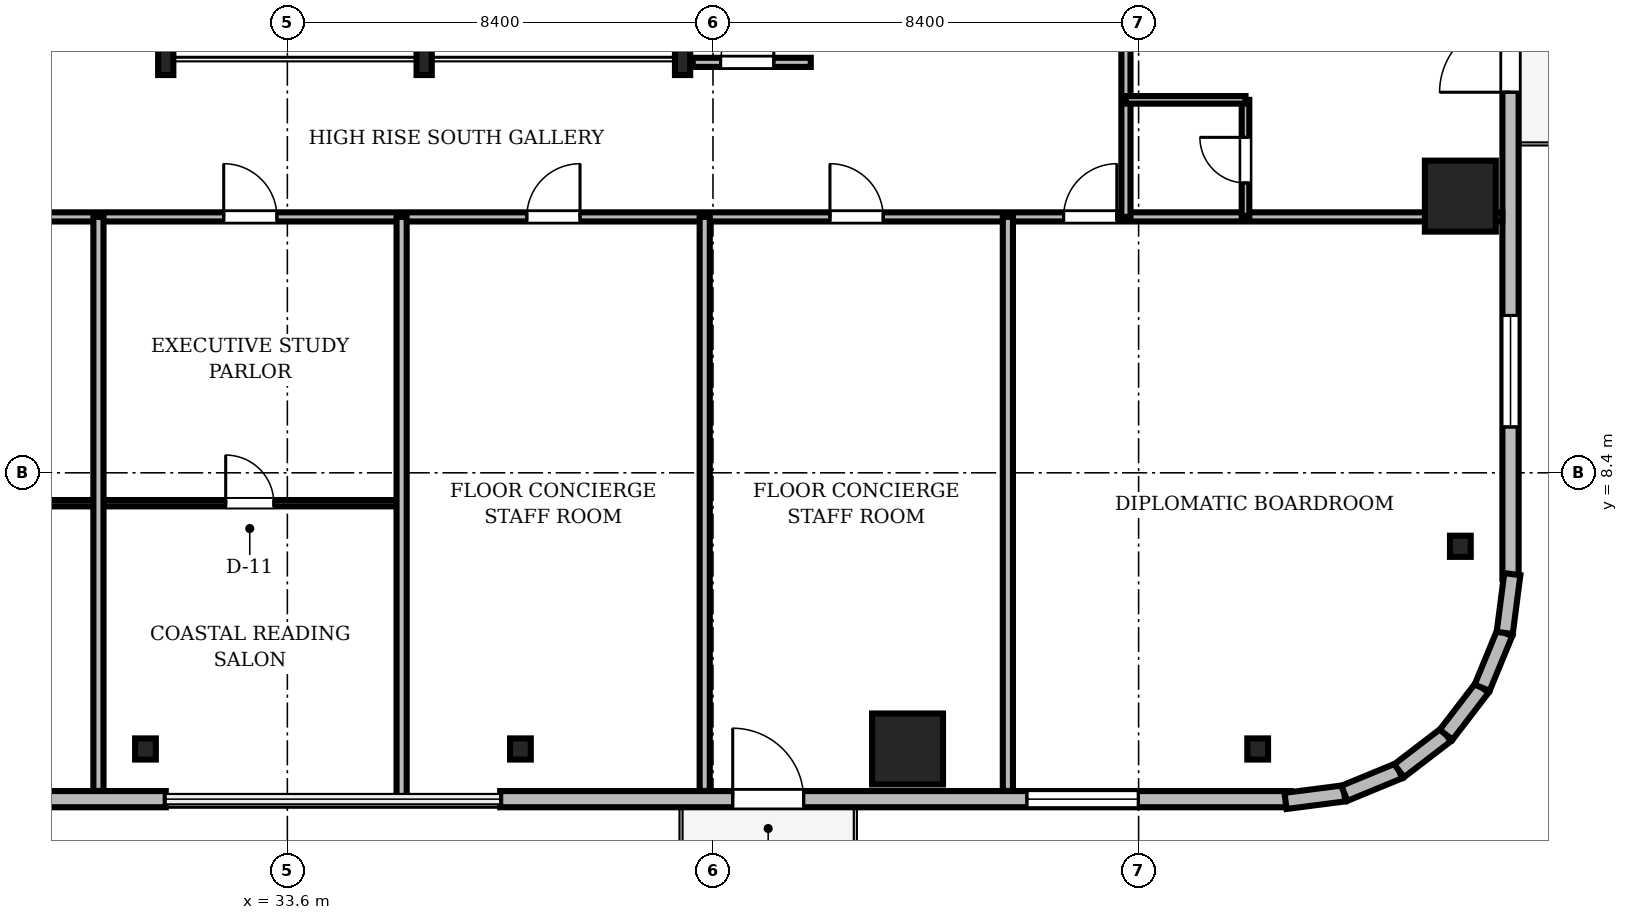
"""IFC4 building model, lengths in metres.
Left out: names, types, materials, properties, quantities, classifications, styles, units other than length and angle.
Written with IfcOpenShell. Run it as: python <this file> out.ifc"""

import sys

from ifc_helpers import new_model, si_unit, direction, frame, frame_2d, origin, origin_2d, place, context, subcontext, project, spatial, rectangle, i_section, extrude, source, transform, mapped, element, fill, save


model = new_model("IFC4")
c1 = context("Model", 3, precision=1e-05, world=origin(), true_north=direction((0.0, 1.0)))
c2 = subcontext(c1, "Body", "Model", "MODEL_VIEW")
j1 = project(units=[si_unit("LENGTHUNIT", "METRE"), si_unit("PLANEANGLEUNIT", "RADIAN")], contexts=[c1])
p1 = place(None, origin())
s1 = spatial("IfcSite", under=j1, at=p1, CompositionType="ELEMENT")
p2 = place(p1, origin())
s2 = spatial("IfcBuilding", under=s1, at=p2, CompositionType="ELEMENT")
p3 = place(p2, frame((0.0, 0.0, 207.3)))
s3 = spatial("IfcBuildingStorey", under=s2, at=p3, CompositionType="ELEMENT", Elevation=207.3)
m1 = source(origin(), c2, "Body", "SweptSolid", [
    extrude(i_section(OverallWidth=0.3, OverallDepth=0.7, WebThickness=0.017, FlangeThickness=0.032, FilletRadius=0.027, at=origin_2d()), origin(), (0.0, 0.0, 1.0), 3.53),
])
for number, where, z_axis, x_axis in (
    (1, (31.2, 16.6, 0.0), (0.0, 0.0, 1.0), (1.0, 0.0, 0.0)),
    (2, (36.3, 16.6, 0.0), (0.0, 0.0, 1.0), (1.0, 0.0, 0.0)),
    (3, (41.4, 16.6, 0.0), (0.0, 0.0, 1.0), (1.0, 0.0, 0.0)),
):
    element("IfcColumn", number, at=place(p3, frame(where, z_axis=z_axis, x_axis=x_axis)), inside=s3, PredefinedType="COLUMN", context=c2, shape_type="MappedRepresentation", body=[
        mapped(m1, transform((0.0, 0.0, 0.0), scale=1.0)),
    ])
m2 = source(origin(), c2, "Body", "SweptSolid", [
    extrude(rectangle(XDim=1.4, YDim=1.4, at=origin_2d()), origin(), (0.0, 0.0, 1.0), 3.53),
])
for number, where, z_axis, x_axis in (
    (4, (45.84, 2.95, 0.0), (0.0, 0.0, 1.0), (1.0, 0.0, 0.0)),
    (5, (56.75, 13.86, 0.0), (0.0, 0.0, 1.0), (1.0, 0.0, 0.0)),
):
    element("IfcColumn", number, at=place(p3, frame(where, z_axis=z_axis, x_axis=x_axis)), inside=s3, PredefinedType="COLUMN", context=c2, shape_type="MappedRepresentation", body=[
        mapped(m2, transform((0.0, 0.0, 0.0), scale=1.0)),
    ])
m3 = source(origin(), c2, "Body", "SweptSolid", [
    extrude(i_section(OverallWidth=0.409, OverallDepth=0.417, WebThickness=0.021, FlangeThickness=0.033, FilletRadius=0.015, at=origin_2d()), origin(), (0.0, 0.0, 1.0), 3.53),
])
for number, where, z_axis, x_axis in (
    (6, (30.8, 2.95, 0.0), (0.0, 0.0, 1.0), (1.0, 0.0, 0.0)),
    (7, (38.2, 2.95, 0.0), (0.0, 0.0, 1.0), (1.0, 0.0, 0.0)),
    (8, (52.75, 2.95, 0.0), (0.0, 0.0, 1.0), (1.0, 0.0, 0.0)),
    (9, (56.75, 6.95, 0.0), (0.0, 0.0, 1.0), (1.0, 0.0, 0.0)),
):
    element("IfcColumn", number, at=place(p3, frame(where, z_axis=z_axis, x_axis=x_axis)), inside=s3, PredefinedType="COLUMN", context=c2, shape_type="MappedRepresentation", body=[
        mapped(m3, transform((0.0, 0.0, 0.0), scale=1.0)),
    ])
m4 = source(origin(), c2, "Body", "SweptSolid", [
    extrude(rectangle(XDim=15.6, YDim=0.32, at=frame_2d((7.8, 0.0))), origin(), (0.0, 0.0, 1.0), 3.53),
])
p4 = place(p3, frame((15.6, 1.96, 0.0), z_axis=(0.0, 0.0, 1.0), x_axis=(1.0, 0.0, 0.0)))
e10 = element("IfcWall", 10, at=p4, inside=s3, PredefinedType="SOLIDWALL", context=c2, shape_type="MappedRepresentation", body=[
    mapped(m4, transform((0.0, 0.0, 0.0), scale=1.0)),
])
m5 = source(origin(), c2, "Body", "SweptSolid", [
    extrude(rectangle(XDim=2.2, YDim=2.4, at=frame_2d((1.1, 1.2))), frame((0.0, 0.17, 0.0), z_axis=(0.0, -1.0, 0.0), x_axis=(1.0, 0.0, 0.0)), (0.0, 0.0, 1.0), 0.34),
])
p5 = place(p4, frame((3.005, 0.0, 0.72)))
e11 = element("IfcOpeningElement", 11, at=p5, cuts=e10, PredefinedType="OPENING", context=c2, shape_type="MappedRepresentation", body=[
    mapped(m5, transform((0.0, 0.0, 0.0), scale=1.0)),
])
p6 = place(p3, frame((37.8, 1.96, 0.0), z_axis=(0.0, 0.0, 1.0), x_axis=(1.0, 0.0, 0.0)))
e12 = element("IfcWall", 12, at=p6, inside=s3, PredefinedType="SOLIDWALL", context=c2, shape_type="MappedRepresentation", body=[
    mapped(m4, transform((0.0, 0.0, 0.0), scale=1.0)),
])
m6 = source(origin(), c2, "Body", "SweptSolid", [
    extrude(rectangle(XDim=1.4, YDim=2.3, at=frame_2d((0.7, 1.15))), frame((0.0, 0.17, 0.0), z_axis=(0.0, -1.0, 0.0), x_axis=(1.0, 0.0, 0.0)), (0.0, 0.0, 1.0), 0.34),
])
p7 = place(p6, frame((4.59, 0.0, 0.0)))
e13 = element("IfcOpeningElement", 13, at=p7, cuts=e12, PredefinedType="OPENING", context=c2, shape_type="MappedRepresentation", body=[
    mapped(m6, transform((0.0, 0.0, 0.0), scale=1.0)),
])
p8 = place(p6, frame((10.395, 0.0, 0.72)))
e14 = element("IfcOpeningElement", 14, at=p8, cuts=e12, PredefinedType="OPENING", context=c2, shape_type="MappedRepresentation", body=[
    mapped(m5, transform((0.0, 0.0, 0.0), scale=1.0)),
])
p9 = place(p3, frame((57.74, 6.3, 0.0), z_axis=(0.0, 0.0, 1.0), x_axis=(0.0, 1.0, 0.0)))
e15 = element("IfcWall", 15, at=p9, inside=s3, PredefinedType="SOLIDWALL", context=c2, shape_type="MappedRepresentation", body=[
    mapped(m4, transform((0.0, 0.0, 0.0), scale=1.0)),
])
p10 = place(p9, frame((9.61, 0.0, 0.0)))
e16 = element("IfcOpeningElement", 16, at=p10, cuts=e15, PredefinedType="OPENING", context=c2, shape_type="MappedRepresentation", body=[
    mapped(m6, transform((0.0, 0.0, 0.0), scale=1.0)),
])
p11 = place(p9, frame((3.005, 0.0, 0.72)))
e17 = element("IfcOpeningElement", 17, at=p11, cuts=e15, PredefinedType="OPENING", context=c2, shape_type="MappedRepresentation", body=[
    mapped(m5, transform((0.0, 0.0, 0.0), scale=1.0)),
])
m7 = source(origin(), c2, "Body", "SweptSolid", [
    extrude(rectangle(XDim=1.17, YDim=0.32, at=frame_2d((0.585, 0.0))), origin(), (0.0, 0.0, 1.0), 3.53),
])
p12 = place(p3, frame((53.3, 1.925, 0.0), z_axis=(0.0, 0.0, 1.0), x_axis=(0.991762485493, 0.128090485085, 0.0)))
e18 = element("IfcWall", 18, at=p12, inside=s3, PredefinedType="SOLIDWALL", context=c2, shape_type="MappedRepresentation", body=[
    mapped(m7, transform((0.0, 0.0, 0.0), scale=1.0)),
])
m8 = source(origin(), c2, "Body", "SweptSolid", [
    extrude(rectangle(XDim=1.169, YDim=0.32, at=frame_2d((0.585, 0.0))), origin(), (0.0, 0.0, 1.0), 3.53),
])
p13 = place(p3, frame((54.46, 2.074, 0.0), z_axis=(0.0, 0.0, 1.0), x_axis=(0.924479075121, 0.381232789334, 0.0)))
e19 = element("IfcWall", 19, at=p13, inside=s3, PredefinedType="SOLIDWALL", context=c2, shape_type="MappedRepresentation", body=[
    mapped(m8, transform((0.0, 0.0, 0.0), scale=1.0)),
])
m9 = source(origin(), c2, "Body", "SweptSolid", [
    extrude(rectangle(XDim=1.169, YDim=0.32, at=frame_2d((0.584, 0.0))), origin(), (0.0, 0.0, 1.0), 3.53),
])
p14 = place(p3, frame((55.541, 2.52, 0.0), z_axis=(0.0, 0.0, 1.0), x_axis=(0.793663520347, 0.608356981114, 0.0)))
e20 = element("IfcWall", 20, at=p14, inside=s3, PredefinedType="SOLIDWALL", context=c2, shape_type="MappedRepresentation", body=[
    mapped(m9, transform((0.0, 0.0, 0.0), scale=1.0)),
])
m10 = source(origin(), c2, "Body", "SweptSolid", [
    extrude(rectangle(XDim=1.169, YDim=0.32, at=frame_2d((0.584, 0.0))), origin(), (0.0, 0.0, 1.0), 3.53),
])
for number, where, z_axis, x_axis in (
    (21, (56.469, 3.231, 0.0), (0.0, 0.0, 1.0), (0.608, 0.794, 0.0)),
    (22, (57.18, 4.159, 0.0), (0.0, 0.0, 1.0), (0.381, 0.925, 0.0)),
):
    element("IfcWall", number, at=place(p3, frame(where, z_axis=z_axis, x_axis=x_axis)), inside=s3, PredefinedType="SOLIDWALL", context=c2, shape_type="MappedRepresentation", body=[
        mapped(m10, transform((0.0, 0.0, 0.0), scale=1.0)),
    ])
m11 = source(origin(), c2, "Body", "SweptSolid", [
    extrude(rectangle(XDim=1.171, YDim=0.32, at=frame_2d((0.585, 0.0))), origin(), (0.0, 0.0, 1.0), 3.53),
])
p15 = place(p3, frame((57.625, 5.24, 0.0), z_axis=(0.0, 0.0, 1.0), x_axis=(0.128269133229, 0.991739395941, 0.0)))
e23 = element("IfcWall", 23, at=p15, inside=s3, PredefinedType="SOLIDWALL", context=c2, shape_type="MappedRepresentation", body=[
    mapped(m11, transform((0.0, 0.0, 0.0), scale=1.0)),
])
m12 = source(origin(), c2, "Body", "SweptSolid", [
    extrude(rectangle(XDim=46.156, YDim=0.18, at=frame_2d((23.078, 0.0))), origin(), (0.0, 0.0, 1.0), 2.772),
])
p16 = place(p3, frame((11.422, 13.45, 0.0), z_axis=(0.0, 0.0, 1.0), x_axis=(1.0, 0.0, 0.0)))
e24 = element("IfcWall", 24, at=p16, inside=s3, PredefinedType="PARTITIONING", context=c2, shape_type="MappedRepresentation", body=[
    mapped(m12, transform((0.0, 0.0, 0.0), scale=1.0)),
])
m13 = source(origin(), c2, "Body", "SweptSolid", [
    extrude(rectangle(XDim=1.05, YDim=2.2, at=frame_2d((0.525, 1.1))), frame((0.0, 0.1, 0.0), z_axis=(0.0, -1.0, 0.0), x_axis=(1.0, 0.0, 0.0)), (0.0, 0.0, 1.0), 0.2),
])
p17 = place(p16, frame((11.118, 0.0, 0.0)))
e25 = element("IfcOpeningElement", 25, at=p17, cuts=e24, PredefinedType="OPENING", context=c2, shape_type="MappedRepresentation", body=[
    mapped(m13, transform((0.0, 0.0, 0.0), scale=1.0)),
])
p18 = place(p16, frame((14.939, 0.0, 0.0)))
e26 = element("IfcOpeningElement", 26, at=p18, cuts=e24, PredefinedType="OPENING", context=c2, shape_type="MappedRepresentation", body=[
    mapped(m13, transform((0.0, 0.0, 0.0), scale=1.0)),
])
p19 = place(p16, frame((20.922, 0.0, 0.0)))
e27 = element("IfcOpeningElement", 27, at=p19, cuts=e24, PredefinedType="OPENING", context=c2, shape_type="MappedRepresentation", body=[
    mapped(m13, transform((0.0, 0.0, 0.0), scale=1.0)),
])
p20 = place(p16, frame((26.904, 0.0, 0.0)))
e28 = element("IfcOpeningElement", 28, at=p20, cuts=e24, PredefinedType="OPENING", context=c2, shape_type="MappedRepresentation", body=[
    mapped(m13, transform((0.0, 0.0, 0.0), scale=1.0)),
])
p21 = place(p16, frame((32.887, 0.0, 0.0)))
e29 = element("IfcOpeningElement", 29, at=p21, cuts=e24, PredefinedType="OPENING", context=c2, shape_type="MappedRepresentation", body=[
    mapped(m13, transform((0.0, 0.0, 0.0), scale=1.0)),
])
p22 = place(p16, frame((37.498, 0.0, 0.0)))
e30 = element("IfcOpeningElement", 30, at=p22, cuts=e24, PredefinedType="OPENING", context=c2, shape_type="MappedRepresentation", body=[
    mapped(m13, transform((0.0, 0.0, 0.0), scale=1.0)),
])
m14 = source(origin(), c2, "Body", "SweptSolid", [
    extrude(rectangle(XDim=27.65, YDim=0.18, at=frame_2d((13.825, 0.0))), origin(), (0.0, 0.0, 1.0), 2.972),
])
p23 = place(p3, frame((50.15, 13.45, 0.0), z_axis=(0.0, 0.0, 1.0), x_axis=(0.0, 1.0, 0.0)))
e31 = element("IfcWall", 31, at=p23, inside=s3, PredefinedType="PARTITIONING", context=c2, shape_type="MappedRepresentation", body=[
    mapped(m14, transform((0.0, 0.0, 0.0), scale=1.0)),
])
p24 = place(p23, frame((5.237, 0.0, 0.0)))
e32 = element("IfcOpeningElement", 32, at=p24, cuts=e31, PredefinedType="OPENING", context=c2, shape_type="MappedRepresentation", body=[
    mapped(m13, transform((0.0, 0.0, 0.0), scale=1.0)),
])
p25 = place(p23, frame((14.38, 0.0, 0.0)))
e33 = element("IfcOpeningElement", 33, at=p25, cuts=e31, PredefinedType="OPENING", context=c2, shape_type="MappedRepresentation", body=[
    mapped(m13, transform((0.0, 0.0, 0.0), scale=1.0)),
])
p26 = place(p23, frame((23.523, 0.0, 0.0)))
e34 = element("IfcOpeningElement", 34, at=p26, cuts=e31, PredefinedType="OPENING", context=c2, shape_type="MappedRepresentation", body=[
    mapped(m13, transform((0.0, 0.0, 0.0), scale=1.0)),
])
m15 = source(origin(), c2, "Body", "SweptSolid", [
    extrude(rectangle(XDim=5.983, YDim=0.125, at=frame_2d((2.991, 0.0))), origin(), (0.0, 0.0, 1.0), 2.972),
])
p27 = place(p3, frame((29.872, 7.8, 0.0), z_axis=(0.0, 0.0, 1.0), x_axis=(1.0, 0.0, 0.0)))
e35 = element("IfcWall", 35, at=p27, inside=s3, PredefinedType="PARTITIONING", context=c2, shape_type="MappedRepresentation", body=[
    mapped(m15, transform((0.0, 0.0, 0.0), scale=1.0)),
])
m16 = source(origin(), c2, "Body", "SweptSolid", [
    extrude(rectangle(XDim=0.95, YDim=2.15, at=frame_2d((0.475, 1.075))), frame((0.0, 0.073, 0.0), z_axis=(0.0, -1.0, 0.0), x_axis=(1.0, 0.0, 0.0)), (0.0, 0.0, 1.0), 0.145),
])
p28 = place(p27, frame((2.511, 0.0, 0.0)))
e36 = element("IfcOpeningElement", 36, at=p28, cuts=e35, PredefinedType="OPENING", context=c2, shape_type="MappedRepresentation", body=[
    mapped(m16, transform((0.0, 0.0, 0.0), scale=1.0)),
])
m17 = source(origin(), c2, "Body", "SweptSolid", [
    extrude(rectangle(XDim=5.982, YDim=0.125, at=frame_2d((2.991, 0.0))), origin(), (0.0, 0.0, 1.0), 2.972),
])
p29 = place(p3, frame((23.89, 7.8, 0.0), z_axis=(0.0, 0.0, 1.0), x_axis=(1.0, 0.0, 0.0)))
e37 = element("IfcWall", 37, at=p29, inside=s3, PredefinedType="PARTITIONING", context=c2, shape_type="MappedRepresentation", body=[
    mapped(m17, transform((0.0, 0.0, 0.0), scale=1.0)),
])
p30 = place(p29, frame((2.511, 0.0, 0.0)))
e38 = element("IfcOpeningElement", 38, at=p30, cuts=e37, PredefinedType="OPENING", context=c2, shape_type="MappedRepresentation", body=[
    mapped(m16, transform((0.0, 0.0, 0.0), scale=1.0)),
])
m18 = source(origin(), c2, "Body", "SweptSolid", [
    extrude(rectangle(XDim=2.33, YDim=0.18, at=frame_2d((1.165, 0.0))), origin(), (0.0, 0.0, 1.0), 2.972),
])
p31 = place(p3, frame((41.6, 16.5, 0.0), z_axis=(0.0, 0.0, 1.0), x_axis=(1.0, 0.0, 0.0)))
e39 = element("IfcWall", 39, at=p31, inside=s3, PredefinedType="PARTITIONING", context=c2, shape_type="MappedRepresentation", body=[
    mapped(m18, transform((0.0, 0.0, 0.0), scale=1.0)),
])
p32 = place(p31, frame((0.55, 0.0, 0.0)))
e40 = element("IfcOpeningElement", 40, at=p32, cuts=e39, PredefinedType="OPENING", context=c2, shape_type="MappedRepresentation", body=[
    mapped(m13, transform((0.0, 0.0, 0.0), scale=1.0)),
])
m19 = source(origin(), c2, "Body", "SweptSolid", [
    extrude(rectangle(XDim=2.29, YDim=0.15, at=frame_2d((1.145, 0.0))), origin(), (0.0, 0.0, 1.0), 2.972),
])
p33 = place(p3, frame((52.51, 13.47, 0.0), z_axis=(0.0, 0.0, 1.0), x_axis=(0.0, 1.0, 0.0)))
e41 = element("IfcWall", 41, at=p33, inside=s3, PredefinedType="PARTITIONING", context=c2, shape_type="MappedRepresentation", body=[
    mapped(m19, transform((0.0, 0.0, 0.0), scale=1.0)),
])
m20 = source(origin(), c2, "Body", "SweptSolid", [
    extrude(rectangle(XDim=0.9, YDim=2.1, at=frame_2d((0.45, 1.05))), frame((0.0, 0.085, 0.0), z_axis=(0.0, -1.0, 0.0), x_axis=(1.0, 0.0, 0.0)), (0.0, 0.0, 1.0), 0.17),
])
p34 = place(p33, frame((0.65, 0.0, 0.0)))
e42 = element("IfcOpeningElement", 42, at=p34, cuts=e41, PredefinedType="OPENING", context=c2, shape_type="MappedRepresentation", body=[
    mapped(m20, transform((0.0, 0.0, 0.0), scale=1.0)),
])
m21 = source(origin(), c2, "Body", "SweptSolid", [
    extrude(rectangle(XDim=11.328, YDim=0.2, at=frame_2d((5.664, 0.0))), origin(), (0.0, 0.0, 1.0), 2.772),
])
p35 = place(p3, frame((29.872, 2.122, 0.0), z_axis=(0.0, 0.0, 1.0), x_axis=(0.0, 1.0, 0.0)))
e43 = element("IfcWall", 43, at=p35, inside=s3, PredefinedType="PARTITIONING", context=c2, shape_type="MappedRepresentation", body=[
    mapped(m21, transform((0.0, 0.0, 0.0), scale=1.0)),
])
m22 = source(origin(), c2, "Body", "SweptSolid", [
    extrude(rectangle(XDim=11.52, YDim=0.2, at=frame_2d((5.76, 0.0))), origin(), (0.0, 0.0, 1.0), 2.772),
])
p36 = place(p3, frame((35.855, 1.93, 0.0), z_axis=(0.0, 0.0, 1.0), x_axis=(0.0, 1.0, 0.0)))
e44 = element("IfcWall", 44, at=p36, inside=s3, PredefinedType="PARTITIONING", context=c2, shape_type="MappedRepresentation", body=[
    mapped(m22, transform((0.0, 0.0, 0.0), scale=1.0)),
])
for number, where, z_axis, x_axis in (
    (45, (41.837, 2.122, 0.0), (0.0, 0.0, 1.0), (0.0, 1.0, 0.0)),
    (46, (47.82, 2.122, 0.0), (0.0, 0.0, 1.0), (0.0, 1.0, 0.0)),
):
    element("IfcWall", number, at=place(p3, frame(where, z_axis=z_axis, x_axis=x_axis)), inside=s3, PredefinedType="PARTITIONING", context=c2, shape_type="MappedRepresentation", body=[
        mapped(m21, transform((0.0, 0.0, 0.0), scale=1.0)),
    ])
m23 = source(origin(), c2, "Body", "SweptSolid", [
    extrude(rectangle(XDim=2.36, YDim=0.15, at=frame_2d((1.18, 0.0))), origin(), (0.0, 0.0, 1.0), 3.53),
])
p37 = place(p3, frame((50.15, 15.76, 0.0), z_axis=(0.0, 0.0, 1.0), x_axis=(1.0, 0.0, 0.0)))
e47 = element("IfcWall", 47, at=p37, inside=s3, PredefinedType="PARTITIONING", context=c2, shape_type="MappedRepresentation", body=[
    mapped(m23, transform((0.0, 0.0, 0.0), scale=1.0)),
])
m24 = source(origin(), c2, "Body", "SweptSolid", [
    extrude(rectangle(XDim=1.4, YDim=2.3, at=frame_2d((0.7, 1.15))), frame((0.0, 0.025, 0.0), z_axis=(0.0, -1.0, 0.0), x_axis=(1.0, 0.0, 0.0)), (0.0, 0.0, 1.0), 0.05),
])
p38 = place(p7, frame((1.4, 0.0, 0.0), z_axis=(0.0, 0.0, 1.0), x_axis=(-1.0, 0.0, 0.0)))
e48 = element("IfcDoor", 48, at=p38, inside=s3, OperationType="DOUBLE_DOOR_SLIDING", PredefinedType="DOOR", context=c2, shape_type="MappedRepresentation", body=[
    mapped(m24, transform((0.0, 0.0, 0.0), scale=1.0)),
])
fill(e13, e48)
m25 = source(origin(), c2, "Body", "SweptSolid", [
    extrude(rectangle(XDim=2.2, YDim=2.4, at=frame_2d((1.1, 1.2))), frame((0.0, 0.03, 0.0), z_axis=(0.0, -1.0, 0.0), x_axis=(1.0, 0.0, 0.0)), (0.0, 0.0, 1.0), 0.06),
])
p39 = place(p8, origin())
e49 = element("IfcWindow", 49, at=p39, inside=s3, PartitioningType="SINGLE_PANEL", PredefinedType="WINDOW", context=c2, shape_type="MappedRepresentation", body=[
    mapped(m25, transform((0.0, 0.0, 0.0), scale=1.0)),
])
fill(e14, e49)
p40 = place(p10, frame((1.4, 0.0, 0.0), z_axis=(0.0, 0.0, 1.0), x_axis=(-1.0, 0.0, 0.0)))
e50 = element("IfcDoor", 50, at=p40, inside=s3, OperationType="DOUBLE_DOOR_SLIDING", PredefinedType="DOOR", context=c2, shape_type="MappedRepresentation", body=[
    mapped(m24, transform((0.0, 0.0, 0.0), scale=1.0)),
])
fill(e16, e50)
p41 = place(p11, origin())
e51 = element("IfcWindow", 51, at=p41, inside=s3, PartitioningType="SINGLE_PANEL", PredefinedType="WINDOW", context=c2, shape_type="MappedRepresentation", body=[
    mapped(m25, transform((0.0, 0.0, 0.0), scale=1.0)),
])
fill(e17, e51)
m26 = source(origin(), c2, "Body", "SweptSolid", [
    extrude(rectangle(XDim=1.05, YDim=2.2, at=frame_2d((0.525, 1.1))), frame((0.0, 0.025, 0.0), z_axis=(0.0, -1.0, 0.0), x_axis=(1.0, 0.0, 0.0)), (0.0, 0.0, 1.0), 0.05),
])
p42 = place(p19, origin())
e52 = element("IfcDoor", 52, at=p42, inside=s3, OperationType="SINGLE_SWING_LEFT", PredefinedType="DOOR", context=c2, shape_type="MappedRepresentation", body=[
    mapped(m26, transform((0.0, 0.0, 0.0), scale=1.0)),
])
fill(e27, e52)
p43 = place(p20, origin())
e53 = element("IfcDoor", 53, at=p43, inside=s3, OperationType="SINGLE_SWING_RIGHT", PredefinedType="DOOR", context=c2, shape_type="MappedRepresentation", body=[
    mapped(m26, transform((0.0, 0.0, 0.0), scale=1.0)),
])
fill(e28, e53)
p44 = place(p21, origin())
e54 = element("IfcDoor", 54, at=p44, inside=s3, OperationType="SINGLE_SWING_LEFT", PredefinedType="DOOR", context=c2, shape_type="MappedRepresentation", body=[
    mapped(m26, transform((0.0, 0.0, 0.0), scale=1.0)),
])
fill(e29, e54)
p45 = place(p22, origin())
e55 = element("IfcDoor", 55, at=p45, inside=s3, OperationType="SINGLE_SWING_RIGHT", PredefinedType="DOOR", context=c2, shape_type="MappedRepresentation", body=[
    mapped(m26, transform((0.0, 0.0, 0.0), scale=1.0)),
])
fill(e30, e55)
m27 = source(origin(), c2, "Body", "SweptSolid", [
    extrude(rectangle(XDim=0.95, YDim=2.15, at=frame_2d((0.475, 1.075))), frame((0.0, 0.025, 0.0), z_axis=(0.0, -1.0, 0.0), x_axis=(1.0, 0.0, 0.0)), (0.0, 0.0, 1.0), 0.05),
])
p46 = place(p28, origin())
e56 = element("IfcDoor", 56, at=p46, inside=s3, OperationType="SINGLE_SWING_LEFT", PredefinedType="DOOR", context=c2, shape_type="MappedRepresentation", body=[
    mapped(m27, transform((0.0, 0.0, 0.0), scale=1.0)),
])
fill(e36, e56)
p47 = place(p32, origin())
e57 = element("IfcDoor", 57, at=p47, inside=s3, OperationType="SINGLE_SWING_RIGHT", PredefinedType="DOOR", context=c2, shape_type="MappedRepresentation", body=[
    mapped(m26, transform((0.0, 0.0, 0.0), scale=1.0)),
])
fill(e40, e57)
m28 = source(origin(), c2, "Body", "SweptSolid", [
    extrude(rectangle(XDim=0.9, YDim=2.1, at=frame_2d((0.45, 1.05))), frame((0.0, 0.025, 0.0), z_axis=(0.0, -1.0, 0.0), x_axis=(1.0, 0.0, 0.0)), (0.0, 0.0, 1.0), 0.05),
])
p48 = place(p34, origin())
e58 = element("IfcDoor", 58, at=p48, inside=s3, OperationType="SINGLE_SWING_RIGHT", PredefinedType="DOOR", context=c2, shape_type="MappedRepresentation", body=[
    mapped(m28, transform((0.0, 0.0, 0.0), scale=1.0)),
])
fill(e42, e58)
save(model, sys.argv[1])
